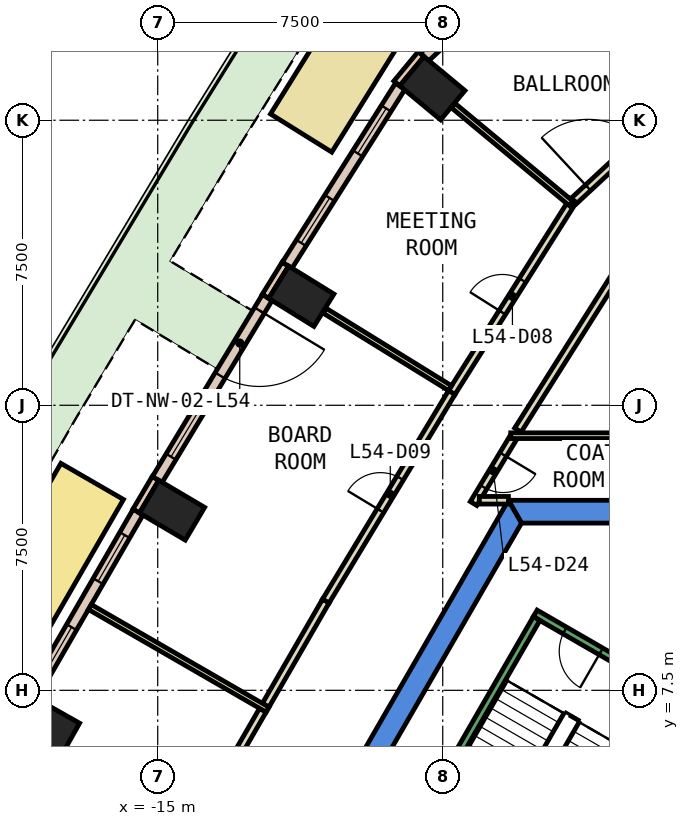
"""IFC4 building model, lengths in metres.
Left out: names, types, materials, properties, quantities, classifications, styles, units other than length and angle.
Written with IfcOpenShell. Run it as: python <this file> out.ifc"""

import sys

from ifc_helpers import new_model, si_unit, direction, frame, frame_2d, origin, origin_2d, place, context, subcontext, project, spatial, polyline, rectangle, outline, extrude, element, fill, save


model = new_model("IFC4")
c1 = context("Model", 3, precision=1e-05, world=origin(), true_north=direction((0.0, 1.0)))
c2 = subcontext(c1, "Body", "Model", "MODEL_VIEW")
j1 = project(units=[si_unit("LENGTHUNIT", "METRE"), si_unit("PLANEANGLEUNIT", "RADIAN")], contexts=[c1])
p1 = place(None, origin())
s1 = spatial("IfcSite", under=j1, at=p1, CompositionType="ELEMENT")
p2 = place(p1, origin())
s2 = spatial("IfcBuilding", under=s1, at=p2, CompositionType="ELEMENT")
p3 = place(p2, frame((0.0, 0.0, 241.4)))
s3 = spatial("IfcBuildingStorey", under=s2, at=p3, CompositionType="ELEMENT", Elevation=241.4)
for number, where, z_axis, x_axis in (
    (1, (-7.774, 23.343, 0.0), (0.0, 0.0, 1.0), (0.639, 0.769, 0.0)),
    (2, (-11.222, 17.869, 0.0), (0.0, 0.0, 1.0), (0.526, 0.851, 0.0)),
    (3, (-14.623, 12.239, 0.0), (0.0, 0.0, 1.0), (0.509, 0.861, 0.0)),
    (4, (-17.911, 6.544, 0.0), (0.0, 0.0, 1.0), (0.491, 0.871, 0.0)),
):
    element("IfcColumn", number, at=place(p3, frame(where, z_axis=z_axis, x_axis=x_axis)), inside=s3, PredefinedType="COLUMN", context=c2, shape_type="SweptSolid", body=[
        extrude(rectangle(XDim=1.0, YDim=1.4, at=origin_2d()), origin(), (0.0, 0.0, 1.0), 3.26),
    ])
p4 = place(p3, frame((0.0, 0.0, -0.6)))
e5 = element("IfcWall", 5, at=p4, inside=s3, PredefinedType="SHEAR", context=c2, shape_type="SweptSolid", body=[
    extrude(outline(polyline([(5.774, 12.5), (-5.774, 12.5), (-5.427, 11.9), (5.427, 11.9), (5.774, 12.5)])), origin(), (0.0, 0.0, 1.0), 3.86),
])
p5 = place(p3, frame((0.0, 0.0, -0.6)))
e6 = element("IfcWall", 6, at=p5, inside=s3, PredefinedType="SHEAR", context=c2, shape_type="SweptSolid", body=[
    extrude(outline(polyline([(-10.535, 4.253), (-10.015, 3.953), (-5.427, 11.9), (-5.774, 12.5), (-10.535, 4.253)])), origin(), (0.0, 0.0, 1.0), 3.86),
])
p6 = place(p3, frame((-8.07, 24.239, 0.0), z_axis=(0.0, 0.0, 1.0), x_axis=(-0.637972365578, -0.770059257953, 0.0)))
e7 = element("IfcWall", 7, at=p6, inside=s3, PredefinedType="STANDARD", context=c2, shape_type="SweptSolid", body=[
    extrude(rectangle(XDim=1.0, YDim=0.2, at=frame_2d((0.5, 0.0))), origin(), (0.0, 0.0, 1.0), 3.26),
])
p7 = place(p3, frame((-11.64, 18.715, 0.0), z_axis=(0.0, 0.0, 1.0), x_axis=(-0.525825307325, -0.850592585306, 0.0)))
e8 = element("IfcWall", 8, at=p7, inside=s3, PredefinedType="STANDARD", context=c2, shape_type="SweptSolid", body=[
    extrude(rectangle(XDim=1.0, YDim=0.2, at=frame_2d((0.5, 0.0))), origin(), (0.0, 0.0, 1.0), 3.26),
])
p8 = place(p3, frame((-15.058, 13.077, 0.0), z_axis=(0.0, 0.0, 1.0), x_axis=(-0.508087253435, -0.86130560366, 0.0)))
e9 = element("IfcWall", 9, at=p8, inside=s3, PredefinedType="STANDARD", context=c2, shape_type="SweptSolid", body=[
    extrude(rectangle(XDim=1.0, YDim=0.2, at=frame_2d((0.5, 0.0))), origin(), (0.0, 0.0, 1.0), 3.26),
])
p9 = place(p3, frame((-5.123, 26.816, 0.0), z_axis=(0.0, 0.0, 1.0), x_axis=(-0.733038780179, -0.680186846942, 0.0)))
e10 = element("IfcWall", 10, at=p9, inside=s3, PredefinedType="STANDARD", context=c2, shape_type="SweptSolid", body=[
    extrude(rectangle(XDim=3.899, YDim=0.3, at=frame_2d((1.949, 0.0))), origin(), (0.0, 0.0, 1.0), 3.26),
])
p10 = place(p9, frame((1.249, 0.0, 0.9)))
e11 = element("IfcOpeningElement", 11, at=p10, cuts=e10, PredefinedType="OPENING", context=c2, shape_type="SweptSolid", body=[
    extrude(rectangle(XDim=1.4, YDim=2.0, at=frame_2d((0.7, 1.0))), frame((0.0, 0.16, 0.0), z_axis=(0.0, -1.0, 0.0), x_axis=(1.0, 0.0, 0.0)), (0.0, 0.0, 1.0), 0.32),
])
p11 = place(p3, frame((-8.618, 23.396, 0.0), z_axis=(0.0, 0.0, 1.0), x_axis=(-0.534088597203, -0.845428512849, 0.0)))
e12 = element("IfcWall", 12, at=p11, inside=s3, PredefinedType="STANDARD", context=c2, shape_type="SweptSolid", body=[
    extrude(rectangle(XDim=5.572, YDim=0.3, at=frame_2d((2.786, 0.0))), origin(), (0.0, 0.0, 1.0), 3.26),
])
p12 = place(p11, frame((0.693, 0.0, 0.9)))
e13 = element("IfcOpeningElement", 13, at=p12, cuts=e12, PredefinedType="OPENING", context=c2, shape_type="SweptSolid", body=[
    extrude(rectangle(XDim=1.4, YDim=2.0, at=frame_2d((0.7, 1.0))), frame((0.0, 0.16, 0.0), z_axis=(0.0, -1.0, 0.0), x_axis=(1.0, 0.0, 0.0)), (0.0, 0.0, 1.0), 0.32),
])
p13 = place(p11, frame((3.479, 0.0, 0.9)))
e14 = element("IfcOpeningElement", 14, at=p13, cuts=e12, PredefinedType="OPENING", context=c2, shape_type="SweptSolid", body=[
    extrude(rectangle(XDim=1.4, YDim=2.0, at=frame_2d((0.7, 1.0))), frame((0.0, 0.16, 0.0), z_axis=(0.0, -1.0, 0.0), x_axis=(1.0, 0.0, 0.0)), (0.0, 0.0, 1.0), 0.32),
])
p14 = place(p3, frame((-12.118, 17.836, 0.0), z_axis=(0.0, 0.0, 1.0), x_axis=(-0.517169592475, -0.855882943293, 0.0)))
e15 = element("IfcWall", 15, at=p14, inside=s3, PredefinedType="STANDARD", context=c2, shape_type="SweptSolid", body=[
    extrude(rectangle(XDim=5.594, YDim=0.3, at=frame_2d((2.797, 0.0))), origin(), (0.0, 0.0, 1.0), 3.26),
])
p15 = place(p14, frame((0.399, 0.0, 0.0)))
e16 = element("IfcOpeningElement", 16, at=p15, cuts=e15, PredefinedType="OPENING", context=c2, shape_type="SweptSolid", body=[
    extrude(rectangle(XDim=2.0, YDim=2.4, at=frame_2d((1.0, 1.2))), frame((0.0, 0.16, 0.0), z_axis=(0.0, -1.0, 0.0), x_axis=(1.0, 0.0, 0.0)), (0.0, 0.0, 1.0), 0.32),
])
p16 = place(p14, frame((3.496, 0.0, 0.9)))
e17 = element("IfcOpeningElement", 17, at=p16, cuts=e15, PredefinedType="OPENING", context=c2, shape_type="SweptSolid", body=[
    extrude(rectangle(XDim=1.4, YDim=2.0, at=frame_2d((0.7, 1.0))), frame((0.0, 0.16, 0.0), z_axis=(0.0, -1.0, 0.0), x_axis=(1.0, 0.0, 0.0)), (0.0, 0.0, 1.0), 0.32),
])
p17 = place(p3, frame((-15.518, 12.189, 0.0), z_axis=(0.0, 0.0, 1.0), x_axis=(-0.49995037644, -0.866054052065, 0.0)))
e18 = element("IfcWall", 18, at=p17, inside=s3, PredefinedType="STANDARD", context=c2, shape_type="SweptSolid", body=[
    extrude(rectangle(XDim=5.594, YDim=0.3, at=frame_2d((2.797, 0.0))), origin(), (0.0, 0.0, 1.0), 3.26),
])
p18 = place(p17, frame((0.699, 0.0, 0.9)))
e19 = element("IfcOpeningElement", 19, at=p18, cuts=e18, PredefinedType="OPENING", context=c2, shape_type="SweptSolid", body=[
    extrude(rectangle(XDim=1.4, YDim=2.0, at=frame_2d((0.7, 1.0))), frame((0.0, 0.16, 0.0), z_axis=(0.0, -1.0, 0.0), x_axis=(1.0, 0.0, 0.0)), (0.0, 0.0, 1.0), 0.32),
])
p19 = place(p17, frame((3.496, 0.0, 0.9)))
e20 = element("IfcOpeningElement", 20, at=p19, cuts=e18, PredefinedType="OPENING", context=c2, shape_type="SweptSolid", body=[
    extrude(rectangle(XDim=1.4, YDim=2.0, at=frame_2d((0.7, 1.0))), frame((0.0, 0.16, 0.0), z_axis=(0.0, -1.0, 0.0), x_axis=(1.0, 0.0, 0.0)), (0.0, 0.0, 1.0), 0.32),
])
p20 = place(p3, frame((-8.081, 27.209, 0.0), z_axis=(0.0, 0.0, 1.0), x_axis=(-0.528950321205, -0.848652789836, 0.0)))
e21 = element("IfcWall", 21, at=p20, inside=s3, PredefinedType="STANDARD", context=c2, shape_type="SweptSolid", body=[
    extrude(rectangle(XDim=5.946, YDim=1.9, at=frame_2d((2.973, 0.0))), origin(), (0.0, 0.0, 1.0), 0.8),
])
p21 = place(p3, frame((-16.725, 12.997, 0.0), z_axis=(0.0, 0.0, 1.0), x_axis=(-0.499964737226, -0.866045761799, 0.0)))
e22 = element("IfcWall", 22, at=p21, inside=s3, PredefinedType="STANDARD", context=c2, shape_type="SweptSolid", body=[
    extrude(rectangle(XDim=5.786, YDim=1.9, at=frame_2d((2.893, 0.0))), origin(), (0.0, 0.0, 1.0), 0.8),
])
p22 = place(p3, frame((-5.65, 14.136, 0.0), z_axis=(0.0, 0.0, 1.0), x_axis=(-0.516869099034, -0.856064445275, 0.0)))
e23 = element("IfcWall", 23, at=p22, inside=s3, PredefinedType="PARTITIONING", context=c2, shape_type="SweptSolid", body=[
    extrude(rectangle(XDim=2.01, YDim=0.2, at=frame_2d((1.005, 0.0))), origin(), (0.0, 0.0, 1.0), 3.26),
])
p23 = place(p22, frame((0.505, 0.0, 0.0)))
e24 = element("IfcOpeningElement", 24, at=p23, cuts=e23, PredefinedType="OPENING", context=c2, shape_type="SweptSolid", body=[
    extrude(rectangle(XDim=1.0, YDim=2.1, at=frame_2d((0.5, 1.05))), frame((0.0, 0.11, 0.0), z_axis=(0.0, -1.0, 0.0), x_axis=(1.0, 0.0, 0.0)), (0.0, 0.0, 1.0), 0.22),
])
p24 = place(p3, frame((-6.537, 12.501, 0.0), z_axis=(0.0, 0.0, 1.0), x_axis=(1.0, 0.0, 0.0)))
e25 = element("IfcWall", 25, at=p24, inside=s3, PredefinedType="PARTITIONING", context=c2, shape_type="SweptSolid", body=[
    extrude(rectangle(XDim=0.766, YDim=0.2, at=frame_2d((0.383, 0.0))), origin(), (0.0, 0.0, 1.0), 3.26),
])
p25 = place(p3, frame((-2.516, 19.106, 0.0), z_axis=(0.0, 0.0, 1.0), x_axis=(-0.534090914267, -0.845427049069, 0.0)))
e26 = element("IfcWall", 26, at=p25, inside=s3, PredefinedType="PARTITIONING", context=c2, shape_type="SweptSolid", body=[
    extrude(rectangle(XDim=5.628, YDim=0.2, at=frame_2d((2.814, 0.0))), origin(), (0.0, 0.0, 1.0), 3.26),
])
p26 = place(p3, frame((-4.048, 20.378, 0.0), z_axis=(0.0, 0.0, 1.0), x_axis=(0.732913830966, 0.680321480169, 0.0)))
e27 = element("IfcWall", 27, at=p26, inside=s3, PredefinedType="PARTITIONING", context=c2, shape_type="SweptSolid", body=[
    extrude(rectangle(XDim=2.818, YDim=0.2, at=frame_2d((1.409, 0.0))), origin(), (0.0, 0.0, 1.0), 3.26),
])
p27 = place(p26, frame((0.509, 0.0, 0.0)))
e28 = element("IfcOpeningElement", 28, at=p27, cuts=e27, PredefinedType="OPENING", context=c2, shape_type="SweptSolid", body=[
    extrude(rectangle(XDim=1.8, YDim=2.1, at=frame_2d((0.9, 1.05))), frame((0.0, 0.11, 0.0), z_axis=(0.0, -1.0, 0.0), x_axis=(1.0, 0.0, 0.0)), (0.0, 0.0, 1.0), 0.22),
])
p28 = place(p3, frame((-7.264, 15.335, 0.0), z_axis=(0.0, 0.0, 1.0), x_axis=(0.533989921757, 0.845490841737, 0.0)))
e29 = element("IfcWall", 29, at=p28, inside=s3, PredefinedType="PARTITIONING", context=c2, shape_type="SweptSolid", body=[
    extrude(rectangle(XDim=5.985, YDim=0.2, at=frame_2d((2.992, 0.0))), origin(), (0.0, 0.0, 1.0), 3.26),
])
p29 = place(p28, frame((2.492, 0.0, 0.0)))
e30 = element("IfcOpeningElement", 30, at=p29, cuts=e29, PredefinedType="OPENING", context=c2, shape_type="SweptSolid", body=[
    extrude(rectangle(XDim=1.0, YDim=2.1, at=frame_2d((0.5, 1.05))), frame((0.0, 0.11, 0.0), z_axis=(0.0, -1.0, 0.0), x_axis=(1.0, 0.0, 0.0)), (0.0, 0.0, 1.0), 0.22),
])
p30 = place(p3, frame((-12.159, 7.107, 0.0), z_axis=(0.0, 0.0, 1.0), x_axis=(0.499953838557, 0.866052053466, 0.0)))
e31 = element("IfcWall", 31, at=p30, inside=s3, PredefinedType="PARTITIONING", context=c2, shape_type="SweptSolid", body=[
    extrude(rectangle(XDim=3.166, YDim=0.2, at=frame_2d((1.583, 0.0))), origin(), (0.0, 0.0, 1.0), 3.26),
])
p31 = place(p3, frame((-10.576, 9.849, 0.0), z_axis=(0.0, 0.0, 1.0), x_axis=(0.517026085378, 0.855969641423, 0.0)))
e32 = element("IfcWall", 32, at=p31, inside=s3, PredefinedType="PARTITIONING", context=c2, shape_type="SweptSolid", body=[
    extrude(rectangle(XDim=6.408, YDim=0.2, at=frame_2d((3.204, 0.0))), origin(), (0.0, 0.0, 1.0), 3.26),
])
p32 = place(p31, frame((2.779, 0.0, 0.0)))
e33 = element("IfcOpeningElement", 33, at=p32, cuts=e32, PredefinedType="OPENING", context=c2, shape_type="SweptSolid", body=[
    extrude(rectangle(XDim=1.0, YDim=2.1, at=frame_2d((0.5, 1.05))), frame((0.0, 0.11, 0.0), z_axis=(0.0, -1.0, 0.0), x_axis=(1.0, 0.0, 0.0)), (0.0, 0.0, 1.0), 0.22),
])
p33 = place(p3, frame((-13.817, 4.234, 0.0), z_axis=(0.0, 0.0, 1.0), x_axis=(0.499820325382, 0.866129114125, 0.0)))
e34 = element("IfcWall", 34, at=p33, inside=s3, PredefinedType="PARTITIONING", context=c2, shape_type="SweptSolid", body=[
    extrude(rectangle(XDim=3.167, YDim=0.2, at=frame_2d((1.583, 0.0))), origin(), (0.0, 0.0, 1.0), 3.26),
])
p34 = place(p3, frame((-1.457, 14.2, 0.0), z_axis=(0.0, 0.0, 1.0), x_axis=(-1.0, 0.0, 0.0)))
e35 = element("IfcWall", 35, at=p34, inside=s3, PredefinedType="PARTITIONING", context=c2, shape_type="SweptSolid", body=[
    extrude(rectangle(XDim=4.254, YDim=0.15, at=frame_2d((2.127, 0.0))), origin(), (0.0, 0.0, 1.0), 3.26),
])
p35 = place(p3, frame((-4.121, 20.31, 0.0), z_axis=(0.0, 0.0, 1.0), x_axis=(-0.769367727798, 0.638806151679, 0.0)))
e36 = element("IfcWall", 36, at=p35, inside=s3, PredefinedType="PARTITIONING", context=c2, shape_type="SweptSolid", body=[
    extrude(rectangle(XDim=4.028, YDim=0.15, at=frame_2d((2.014, 0.0))), origin(), (0.0, 0.0, 1.0), 3.26),
])
p36 = place(p3, frame((-7.309, 15.451, 0.0), z_axis=(0.0, 0.0, 1.0), x_axis=(-0.850775656528, 0.525529049872, 0.0)))
e37 = element("IfcWall", 37, at=p36, inside=s3, PredefinedType="PARTITIONING", context=c2, shape_type="SweptSolid", body=[
    extrude(rectangle(XDim=3.88, YDim=0.15, at=frame_2d((1.94, 0.0))), origin(), (0.0, 0.0, 1.0), 3.26),
])
p37 = place(p3, frame((-12.11, 6.992, 0.0), z_axis=(0.0, 0.0, 1.0), x_axis=(-0.865994316829, 0.50005384032, 0.0)))
e38 = element("IfcWall", 38, at=p37, inside=s3, PredefinedType="PARTITIONING", context=c2, shape_type="SweptSolid", body=[
    extrude(rectangle(XDim=5.399, YDim=0.15, at=frame_2d((2.7, 0.0))), origin(), (0.0, 0.0, 1.0), 3.26),
])
p38 = place(p3, frame((-1.256, 7.324, 0.0), z_axis=(0.0, 0.0, 1.0), x_axis=(-0.866046073146, 0.499964197906, 0.0)))
e39 = element("IfcWall", 39, at=p38, inside=s3, PredefinedType="STANDARD", context=c2, shape_type="SweptSolid", body=[
    extrude(rectangle(XDim=4.4, YDim=0.2, at=frame_2d((2.2, 0.0))), origin(), (0.0, 0.0, 1.0), 3.26),
])
p39 = place(p38, frame((2.4, 0.0, 0.0)))
e40 = element("IfcOpeningElement", 40, at=p39, cuts=e39, PredefinedType="OPENING", context=c2, shape_type="SweptSolid", body=[
    extrude(rectangle(XDim=1.1, YDim=2.2, at=frame_2d((0.55, 1.1))), frame((0.0, 0.11, 0.0), z_axis=(0.0, -1.0, 0.0), x_axis=(1.0, 0.0, 0.0)), (0.0, 0.0, 1.0), 0.22),
])
p40 = place(p3, frame((-1.393, 7.288, 0.0), z_axis=(0.0, 0.0, 1.0), x_axis=(-0.499963383562, -0.866046543262, 0.0)))
e41 = element("IfcWall", 41, at=p40, inside=s3, PredefinedType="STANDARD", context=c2, shape_type="SweptSolid", body=[
    extrude(rectangle(XDim=6.9, YDim=0.2, at=frame_2d((3.45, 0.0))), origin(), (0.0, 0.0, 1.0), 3.26),
])
p41 = place(p40, frame((0.45, 0.0, 0.0)))
e42 = element("IfcOpeningElement", 42, at=p41, cuts=e41, PredefinedType="OPENING", context=c2, shape_type="SweptSolid", body=[
    extrude(rectangle(XDim=1.1, YDim=2.2, at=frame_2d((0.55, 1.1))), frame((0.0, 0.11, 0.0), z_axis=(0.0, -1.0, 0.0), x_axis=(1.0, 0.0, 0.0)), (0.0, 0.0, 1.0), 0.22),
])
p42 = place(p3, frame((-5.03, 9.388, 0.0), z_axis=(0.0, 0.0, 1.0), x_axis=(-0.499978703459, -0.866037698999, 0.0)))
e43 = element("IfcWall", 43, at=p42, inside=s3, PredefinedType="STANDARD", context=c2, shape_type="SweptSolid", body=[
    extrude(rectangle(XDim=6.9, YDim=0.2, at=frame_2d((3.45, 0.0))), origin(), (0.0, 0.0, 1.0), 3.26),
])
p43 = place(p12, origin())
e44 = element("IfcWindow", 44, at=p43, inside=s3, PartitioningType="SINGLE_PANEL", PredefinedType="WINDOW", context=c2, shape_type="SweptSolid", body=[
    extrude(rectangle(XDim=1.4, YDim=2.0, at=frame_2d((0.7, 1.0))), frame((0.0, 0.03, 0.0), z_axis=(0.0, -1.0, 0.0), x_axis=(1.0, 0.0, 0.0)), (0.0, 0.0, 1.0), 0.06),
])
fill(e13, e44)
p44 = place(p13, origin())
e45 = element("IfcWindow", 45, at=p44, inside=s3, PartitioningType="SINGLE_PANEL", PredefinedType="WINDOW", context=c2, shape_type="SweptSolid", body=[
    extrude(rectangle(XDim=1.4, YDim=2.0, at=frame_2d((0.7, 1.0))), frame((0.0, 0.03, 0.0), z_axis=(0.0, -1.0, 0.0), x_axis=(1.0, 0.0, 0.0)), (0.0, 0.0, 1.0), 0.06),
])
fill(e14, e45)
p45 = place(p15, origin())
e46 = element("IfcDoor", 46, at=p45, inside=s3, OperationType="SLIDING_TO_LEFT", PredefinedType="DOOR", context=c2, shape_type="SweptSolid", body=[
    extrude(rectangle(XDim=2.0, YDim=2.4, at=frame_2d((1.0, 1.2))), frame((0.0, 0.025, 0.0), z_axis=(0.0, -1.0, 0.0), x_axis=(1.0, 0.0, 0.0)), (0.0, 0.0, 1.0), 0.05),
])
fill(e16, e46)
p46 = place(p16, origin())
e47 = element("IfcWindow", 47, at=p46, inside=s3, PartitioningType="SINGLE_PANEL", PredefinedType="WINDOW", context=c2, shape_type="SweptSolid", body=[
    extrude(rectangle(XDim=1.4, YDim=2.0, at=frame_2d((0.7, 1.0))), frame((0.0, 0.03, 0.0), z_axis=(0.0, -1.0, 0.0), x_axis=(1.0, 0.0, 0.0)), (0.0, 0.0, 1.0), 0.06),
])
fill(e17, e47)
p47 = place(p18, origin())
e48 = element("IfcWindow", 48, at=p47, inside=s3, PartitioningType="SINGLE_PANEL", PredefinedType="WINDOW", context=c2, shape_type="SweptSolid", body=[
    extrude(rectangle(XDim=1.4, YDim=2.0, at=frame_2d((0.7, 1.0))), frame((0.0, 0.03, 0.0), z_axis=(0.0, -1.0, 0.0), x_axis=(1.0, 0.0, 0.0)), (0.0, 0.0, 1.0), 0.06),
])
fill(e19, e48)
p48 = place(p19, origin())
e49 = element("IfcWindow", 49, at=p48, inside=s3, PartitioningType="SINGLE_PANEL", PredefinedType="WINDOW", context=c2, shape_type="SweptSolid", body=[
    extrude(rectangle(XDim=1.4, YDim=2.0, at=frame_2d((0.7, 1.0))), frame((0.0, 0.03, 0.0), z_axis=(0.0, -1.0, 0.0), x_axis=(1.0, 0.0, 0.0)), (0.0, 0.0, 1.0), 0.06),
])
fill(e20, e49)
p49 = place(p27, origin())
e50 = element("IfcDoor", 50, at=p49, inside=s3, OperationType="DOUBLE_DOOR_SINGLE_SWING", PredefinedType="DOOR", context=c2, shape_type="SweptSolid", body=[
    extrude(rectangle(XDim=1.8, YDim=2.1, at=frame_2d((0.9, 1.05))), frame((0.0, 0.025, 0.0), z_axis=(0.0, -1.0, 0.0), x_axis=(1.0, 0.0, 0.0)), (0.0, 0.0, 1.0), 0.05),
])
fill(e28, e50)
p50 = place(p29, origin())
e51 = element("IfcDoor", 51, at=p50, inside=s3, OperationType="SINGLE_SWING_LEFT", PredefinedType="DOOR", context=c2, shape_type="SweptSolid", body=[
    extrude(rectangle(XDim=1.0, YDim=2.1, at=frame_2d((0.5, 1.05))), frame((0.0, 0.025, 0.0), z_axis=(0.0, -1.0, 0.0), x_axis=(1.0, 0.0, 0.0)), (0.0, 0.0, 1.0), 0.05),
])
fill(e30, e51)
p51 = place(p32, origin())
e52 = element("IfcDoor", 52, at=p51, inside=s3, OperationType="SINGLE_SWING_LEFT", PredefinedType="DOOR", context=c2, shape_type="SweptSolid", body=[
    extrude(rectangle(XDim=1.0, YDim=2.1, at=frame_2d((0.5, 1.05))), frame((0.0, 0.025, 0.0), z_axis=(0.0, -1.0, 0.0), x_axis=(1.0, 0.0, 0.0)), (0.0, 0.0, 1.0), 0.05),
])
fill(e33, e52)
p52 = place(p23, origin())
e53 = element("IfcDoor", 53, at=p52, inside=s3, OperationType="SINGLE_SWING_LEFT", PredefinedType="DOOR", context=c2, shape_type="SweptSolid", body=[
    extrude(rectangle(XDim=1.0, YDim=2.1, at=frame_2d((0.5, 1.05))), frame((0.0, 0.025, 0.0), z_axis=(0.0, -1.0, 0.0), x_axis=(1.0, 0.0, 0.0)), (0.0, 0.0, 1.0), 0.05),
])
fill(e24, e53)
p53 = place(p39, origin())
e54 = element("IfcDoor", 54, at=p53, inside=s3, OperationType="SINGLE_SWING_LEFT", PredefinedType="DOOR", context=c2, shape_type="SweptSolid", body=[
    extrude(rectangle(XDim=1.1, YDim=2.2, at=frame_2d((0.55, 1.1))), frame((0.0, 0.025, 0.0), z_axis=(0.0, -1.0, 0.0), x_axis=(1.0, 0.0, 0.0)), (0.0, 0.0, 1.0), 0.05),
])
fill(e40, e54)
save(model, sys.argv[1])
